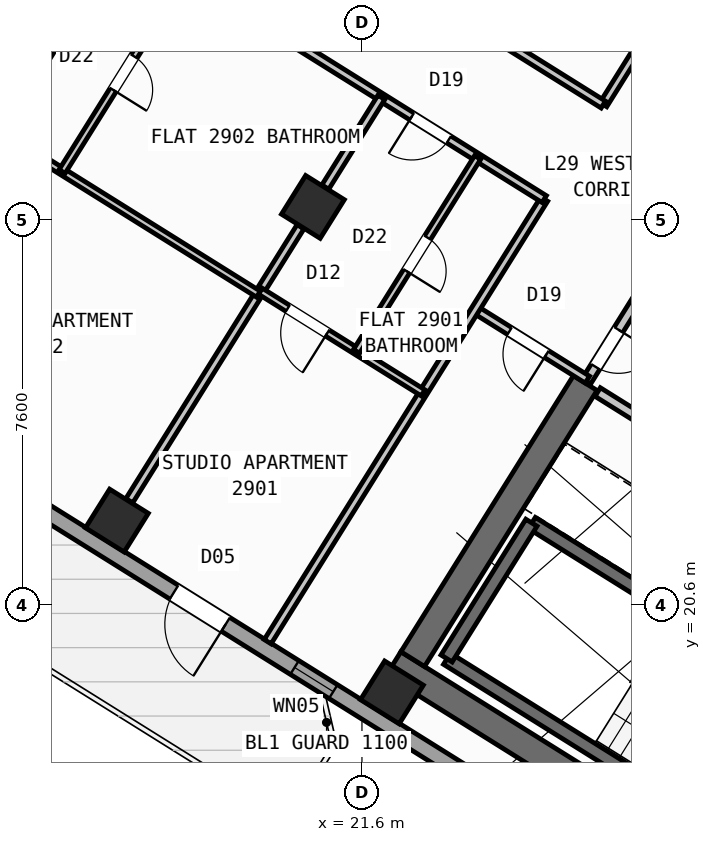
"""IFC4 building model, lengths in metres.
Left out: names, types, materials, properties, quantities, classifications, styles, units other than length and angle.
Written with IfcOpenShell. Run it as: python <this file> out.ifc"""

import sys

from ifc_helpers import new_model, si_unit, direction, frame, frame_2d, origin, origin_2d, place, context, subcontext, project, spatial, rectangle, hollow_rectangle, extrude, source, transform, mapped, element, fill, save


model = new_model("IFC4")
c1 = context("Model", 3, precision=1e-05, world=origin(), true_north=direction((0.0, 1.0)))
c2 = subcontext(c1, "Body", "Model", "MODEL_VIEW")
j1 = project(units=[si_unit("LENGTHUNIT", "METRE"), si_unit("PLANEANGLEUNIT", "RADIAN")], contexts=[c1])
p1 = place(None, origin())
s1 = spatial("IfcSite", under=j1, at=p1, CompositionType="ELEMENT")
p2 = place(p1, origin())
s2 = spatial("IfcBuilding", under=s1, at=p2, CompositionType="ELEMENT")
p3 = place(p2, frame((0.0, 0.0, 116.1)))
s3 = spatial("IfcBuildingStorey", under=s2, at=p3, CompositionType="ELEMENT", Elevation=116.1)
p4 = place(p3, frame((33.366, 12.477, 0.0), z_axis=(0.0, 0.0, 1.0), x_axis=(-0.848047359947, 0.529920442413, 0.0)))
e1 = element("IfcWall", 1, at=p4, inside=s3, PredefinedType="SHEAR", context=c2, shape_type="SweptSolid", body=[
    extrude(rectangle(XDim=13.14, YDim=0.55, at=frame_2d((6.57, 0.0))), origin(), (0.0, 0.0, 1.0), 3.35),
])
p5 = place(p3, frame((26.007, 24.976, 0.0), z_axis=(0.0, 0.0, 1.0), x_axis=(-0.529923795287, -0.848045264823, 0.0)))
e2 = element("IfcWall", 2, at=p5, inside=s3, PredefinedType="SHEAR", context=c2, shape_type="SweptSolid", body=[
    extrude(rectangle(XDim=6.425, YDim=0.55, at=frame_2d((3.212, 0.0))), origin(), (0.0, 0.0, 1.0), 3.35),
])
m1 = source(origin(), c2, "Body", "SweptSolid", [
    extrude(hollow_rectangle(XDim=0.9, YDim=0.9, WallThickness=0.036, at=origin_2d()), origin(), (0.0, 0.0, 1.0), 3.6),
])
for number, where, z_axis, x_axis in (
    (3, (22.191, 18.87, 0.0), (0.0, 0.0, 1.0), (-0.848, 0.53, 0.0)),
    (4, (20.632, 28.452, 0.0), (0.0, 0.0, 1.0), (-0.848, 0.53, 0.0)),
    (5, (16.764, 22.261, 0.0), (0.0, 0.0, 1.0), (-0.848, 0.53, 0.0)),
    (6, (15.205, 31.844, 0.0), (0.0, 0.0, 1.0), (-0.848, 0.53, 0.0)),
):
    element("IfcColumn", number, at=place(p3, frame(where, z_axis=z_axis, x_axis=x_axis)), inside=s3, PredefinedType="COLUMN", context=c2, shape_type="MappedRepresentation", body=[
        mapped(m1, transform((0.0, 0.0, 0.0), scale=1.0)),
    ])
p6 = place(p3, frame((31.76, 12.183, 0.0), z_axis=(0.0, 0.0, 1.0), x_axis=(-0.848047074256, 0.529920899612, 0.0)))
e7 = element("IfcWall", 7, at=p6, inside=s3, PredefinedType="STANDARD", context=c2, shape_type="SweptSolid", body=[
    extrude(rectangle(XDim=30.652, YDim=0.32, at=frame_2d((15.326, 0.0))), origin(), (0.0, 0.0, 1.0), 3.35),
])
p7 = place(p6, frame((15.153, 0.0, 0.0)))
e8 = element("IfcOpeningElement", 8, at=p7, cuts=e7, PredefinedType="OPENING", context=c2, shape_type="SweptSolid", body=[
    extrude(rectangle(XDim=1.2, YDim=2.15, at=frame_2d((0.6, 1.075))), frame((0.0, 0.17, 0.0), z_axis=(0.0, -1.0, 0.0), x_axis=(1.0, 0.0, 0.0)), (0.0, 0.0, 1.0), 0.34),
])
p8 = place(p6, frame((2.002, 0.0, 0.8)))
e9 = element("IfcOpeningElement", 9, at=p8, cuts=e7, PredefinedType="OPENING", context=c2, shape_type="SweptSolid", body=[
    extrude(rectangle(XDim=2.1, YDim=1.55, at=frame_2d((1.05, 0.775))), frame((0.0, 0.17, 0.0), z_axis=(0.0, -1.0, 0.0), x_axis=(1.0, 0.0, 0.0)), (0.0, 0.0, 1.0), 0.34),
])
p9 = place(p6, frame((7.206, 0.0, 0.8)))
e10 = element("IfcOpeningElement", 10, at=p9, cuts=e7, PredefinedType="OPENING", context=c2, shape_type="SweptSolid", body=[
    extrude(rectangle(XDim=2.1, YDim=1.55, at=frame_2d((1.05, 0.775))), frame((0.0, 0.17, 0.0), z_axis=(0.0, -1.0, 0.0), x_axis=(1.0, 0.0, 0.0)), (0.0, 0.0, 1.0), 0.34),
])
p10 = place(p6, frame((12.648, 0.0, 1.0)))
e11 = element("IfcOpeningElement", 11, at=p10, cuts=e7, PredefinedType="OPENING", context=c2, shape_type="SweptSolid", body=[
    extrude(rectangle(XDim=0.9, YDim=1.25, at=frame_2d((0.45, 0.625))), frame((0.0, 0.17, 0.0), z_axis=(0.0, -1.0, 0.0), x_axis=(1.0, 0.0, 0.0)), (0.0, 0.0, 1.0), 0.34),
])
p11 = place(p6, frame((19.458, 0.0, 0.95)))
e12 = element("IfcOpeningElement", 12, at=p11, cuts=e7, PredefinedType="OPENING", context=c2, shape_type="SweptSolid", body=[
    extrude(rectangle(XDim=1.2, YDim=1.4, at=frame_2d((0.6, 0.7))), frame((0.0, 0.17, 0.0), z_axis=(0.0, -1.0, 0.0), x_axis=(1.0, 0.0, 0.0)), (0.0, 0.0, 1.0), 0.34),
])
p12 = place(p6, frame((21.858, 0.0, 0.95)))
e13 = element("IfcOpeningElement", 13, at=p12, cuts=e7, PredefinedType="OPENING", context=c2, shape_type="SweptSolid", body=[
    extrude(rectangle(XDim=1.2, YDim=1.4, at=frame_2d((0.6, 0.7))), frame((0.0, 0.17, 0.0), z_axis=(0.0, -1.0, 0.0), x_axis=(1.0, 0.0, 0.0)), (0.0, 0.0, 1.0), 0.34),
])
p13 = place(p6, frame((27.266, 0.0, 0.8)))
e14 = element("IfcOpeningElement", 14, at=p13, cuts=e7, PredefinedType="OPENING", context=c2, shape_type="SweptSolid", body=[
    extrude(rectangle(XDim=2.1, YDim=1.55, at=frame_2d((1.05, 0.775))), frame((0.0, 0.17, 0.0), z_axis=(0.0, -1.0, 0.0), x_axis=(1.0, 0.0, 0.0)), (0.0, 0.0, 1.0), 0.34),
])
p14 = place(p3, frame((5.7, 28.71, 0.0), z_axis=(0.0, 0.0, 1.0), x_axis=(0.529923711467, 0.8480453172, 0.0)))
e15 = element("IfcWall", 15, at=p14, inside=s3, PredefinedType="STANDARD", context=c2, shape_type="SweptSolid", body=[
    extrude(rectangle(XDim=21.587, YDim=0.32, at=frame_2d((10.794, 0.0))), origin(), (0.0, 0.0, 1.0), 2.775),
])
p15 = place(p14, frame((2.119, 0.0, 0.8)))
e16 = element("IfcOpeningElement", 16, at=p15, cuts=e15, PredefinedType="OPENING", context=c2, shape_type="SweptSolid", body=[
    extrude(rectangle(XDim=2.1, YDim=1.55, at=frame_2d((1.05, 0.775))), frame((0.0, 0.17, 0.0), z_axis=(0.0, -1.0, 0.0), x_axis=(1.0, 0.0, 0.0)), (0.0, 0.0, 1.0), 0.34),
])
p16 = place(p14, frame((17.256, 0.0, 0.85)))
e17 = element("IfcOpeningElement", 17, at=p16, cuts=e15, PredefinedType="OPENING", context=c2, shape_type="SweptSolid", body=[
    extrude(rectangle(XDim=1.8, YDim=1.5, at=frame_2d((0.9, 0.75))), frame((0.0, 0.17, 0.0), z_axis=(0.0, -1.0, 0.0), x_axis=(1.0, 0.0, 0.0)), (0.0, 0.0, 1.0), 0.34),
])
p17 = place(p3, frame((17.424, 47.083, 0.0), z_axis=(0.0, 0.0, 1.0), x_axis=(0.848049927979, -0.529916332693, 0.0)))
e18 = element("IfcWall", 18, at=p17, inside=s3, PredefinedType="STANDARD", context=c2, shape_type="SweptSolid", body=[
    extrude(rectangle(XDim=29.223, YDim=0.32, at=frame_2d((14.612, 0.0))), origin(), (0.0, 0.0, 1.0), 3.35),
])
p18 = place(p17, frame((8.839, 0.0, 0.0)))
e19 = element("IfcOpeningElement", 19, at=p18, cuts=e18, PredefinedType="OPENING", context=c2, shape_type="SweptSolid", body=[
    extrude(rectangle(XDim=1.05, YDim=2.15, at=frame_2d((0.525, 1.075))), frame((0.0, 0.17, 0.0), z_axis=(0.0, -1.0, 0.0), x_axis=(1.0, 0.0, 0.0)), (0.0, 0.0, 1.0), 0.34),
])
p19 = place(p17, frame((0.719, 0.0, 0.85)))
e20 = element("IfcOpeningElement", 20, at=p19, cuts=e18, PredefinedType="OPENING", context=c2, shape_type="SweptSolid", body=[
    extrude(rectangle(XDim=1.8, YDim=1.5, at=frame_2d((0.9, 0.75))), frame((0.0, 0.17, 0.0), z_axis=(0.0, -1.0, 0.0), x_axis=(1.0, 0.0, 0.0)), (0.0, 0.0, 1.0), 0.34),
])
p20 = place(p17, frame((3.981, 0.0, 0.85)))
e21 = element("IfcOpeningElement", 21, at=p20, cuts=e18, PredefinedType="OPENING", context=c2, shape_type="SweptSolid", body=[
    extrude(rectangle(XDim=1.5, YDim=1.5, at=frame_2d((0.75, 0.75))), frame((0.0, 0.17, 0.0), z_axis=(0.0, -1.0, 0.0), x_axis=(1.0, 0.0, 0.0)), (0.0, 0.0, 1.0), 0.34),
])
p21 = place(p17, frame((7.021, 0.0, 0.95)))
e22 = element("IfcOpeningElement", 22, at=p21, cuts=e18, PredefinedType="OPENING", context=c2, shape_type="SweptSolid", body=[
    extrude(rectangle(XDim=1.2, YDim=1.4, at=frame_2d((0.6, 0.7))), frame((0.0, 0.17, 0.0), z_axis=(0.0, -1.0, 0.0), x_axis=(1.0, 0.0, 0.0)), (0.0, 0.0, 1.0), 0.34),
])
p22 = place(p17, frame((14.471, 0.0, 0.95)))
e23 = element("IfcOpeningElement", 23, at=p22, cuts=e18, PredefinedType="OPENING", context=c2, shape_type="SweptSolid", body=[
    extrude(rectangle(XDim=1.2, YDim=1.4, at=frame_2d((0.6, 0.7))), frame((0.0, 0.17, 0.0), z_axis=(0.0, -1.0, 0.0), x_axis=(1.0, 0.0, 0.0)), (0.0, 0.0, 1.0), 0.34),
])
p23 = place(p17, frame((17.254, 0.0, 1.0)))
e24 = element("IfcOpeningElement", 24, at=p23, cuts=e18, PredefinedType="OPENING", context=c2, shape_type="SweptSolid", body=[
    extrude(rectangle(XDim=0.9, YDim=1.25, at=frame_2d((0.45, 0.625))), frame((0.0, 0.17, 0.0), z_axis=(0.0, -1.0, 0.0), x_axis=(1.0, 0.0, 0.0)), (0.0, 0.0, 1.0), 0.34),
])
p24 = place(p17, frame((20.764, 0.0, 0.8)))
e25 = element("IfcOpeningElement", 25, at=p24, cuts=e18, PredefinedType="OPENING", context=c2, shape_type="SweptSolid", body=[
    extrude(rectangle(XDim=2.1, YDim=1.55, at=frame_2d((1.05, 0.775))), frame((0.0, 0.17, 0.0), z_axis=(0.0, -1.0, 0.0), x_axis=(1.0, 0.0, 0.0)), (0.0, 0.0, 1.0), 0.34),
])
p25 = place(p17, frame((25.403, 0.0, 0.8)))
e26 = element("IfcOpeningElement", 26, at=p25, cuts=e18, PredefinedType="OPENING", context=c2, shape_type="SweptSolid", body=[
    extrude(rectangle(XDim=2.1, YDim=1.55, at=frame_2d((1.05, 0.775))), frame((0.0, 0.17, 0.0), z_axis=(0.0, -1.0, 0.0), x_axis=(1.0, 0.0, 0.0)), (0.0, 0.0, 1.0), 0.34),
])
p26 = place(p3, frame((29.605, 15.581, 0.0), z_axis=(0.0, 0.0, 1.0), x_axis=(-0.848036911448, 0.529937163087, 0.0)))
e27 = element("IfcWall", 27, at=p26, inside=s3, PredefinedType="SHEAR", context=c2, shape_type="SweptSolid", body=[
    extrude(rectangle(XDim=7.46, YDim=0.26, at=frame_2d((3.73, 0.0))), origin(), (0.0, 0.0, 1.0), 3.35),
])
p27 = place(p3, frame((31.28, 18.261, 0.0), z_axis=(0.0, 0.0, 1.0), x_axis=(-0.848051618787, 0.529913626805, 0.0)))
e28 = element("IfcWall", 28, at=p27, inside=s3, PredefinedType="SHEAR", context=c2, shape_type="SweptSolid", body=[
    extrude(rectangle(XDim=7.46, YDim=0.26, at=frame_2d((3.73, 0.0))), origin(), (0.0, 0.0, 1.0), 3.35),
])
p28 = place(p27, frame((0.36, 0.0, 0.0)))
e29 = element("IfcOpeningElement", 29, at=p28, cuts=e28, PredefinedType="OPENING", context=c2, shape_type="SweptSolid", body=[
    extrude(rectangle(XDim=0.86, YDim=2.05, at=frame_2d((0.43, 1.025))), frame((0.0, 0.14, 0.0), z_axis=(0.0, -1.0, 0.0), x_axis=(1.0, 0.0, 0.0)), (0.0, 0.0, 1.0), 0.28),
])
p29 = place(p3, frame((24.945, 22.22, 0.0), z_axis=(0.0, 0.0, 1.0), x_axis=(-0.529908658664, -0.84805472316, 0.0)))
e30 = element("IfcWall", 30, at=p29, inside=s3, PredefinedType="SHEAR", context=c2, shape_type="SweptSolid", body=[
    extrude(rectangle(XDim=3.16, YDim=0.26, at=frame_2d((1.58, 0.0))), origin(), (0.0, 0.0, 1.0), 3.35),
])
p30 = place(p3, frame((31.525, 21.504, 0.0), z_axis=(0.0, 0.0, 1.0), x_axis=(-0.848040211232, 0.529931882541, 0.0)))
e31 = element("IfcWall", 31, at=p30, inside=s3, PredefinedType="STANDARD", context=c2, shape_type="SweptSolid", body=[
    extrude(rectangle(XDim=6.218, YDim=0.2, at=frame_2d((3.109, 0.0))), origin(), (0.0, 0.0, 1.0), 3.34),
])
p31 = place(p30, frame((4.4, 0.0, 0.0)))
e32 = element("IfcOpeningElement", 32, at=p31, cuts=e31, PredefinedType="OPENING", context=c2, shape_type="SweptSolid", body=[
    extrude(rectangle(XDim=0.86, YDim=2.05, at=frame_2d((0.43, 1.025))), frame((0.0, 0.11, 0.0), z_axis=(0.0, -1.0, 0.0), x_axis=(1.0, 0.0, 0.0)), (0.0, 0.0, 1.0), 0.22),
])
p32 = place(p30, frame((1.45, 0.0, 0.0)))
e33 = element("IfcOpeningElement", 33, at=p32, cuts=e31, PredefinedType="OPENING", context=c2, shape_type="SweptSolid", body=[
    extrude(rectangle(XDim=0.86, YDim=2.05, at=frame_2d((0.43, 1.025))), frame((0.0, 0.11, 0.0), z_axis=(0.0, -1.0, 0.0), x_axis=(1.0, 0.0, 0.0)), (0.0, 0.0, 1.0), 0.22),
])
p33 = place(p3, frame((27.596, 27.52, 0.0), z_axis=(0.0, 0.0, 1.0), x_axis=(-0.529865479138, -0.848081702443, 0.0)))
e34 = element("IfcWall", 34, at=p33, inside=s3, PredefinedType="STANDARD", context=c2, shape_type="SweptSolid", body=[
    extrude(rectangle(XDim=2.96, YDim=0.2, at=frame_2d((1.48, 0.0))), origin(), (0.0, 0.0, 1.0), 3.34),
])
p34 = place(p33, frame((1.76, 0.0, 0.0)))
e35 = element("IfcOpeningElement", 35, at=p34, cuts=e34, PredefinedType="OPENING", context=c2, shape_type="SweptSolid", body=[
    extrude(rectangle(XDim=0.86, YDim=2.05, at=frame_2d((0.43, 1.025))), frame((0.0, 0.11, 0.0), z_axis=(0.0, -1.0, 0.0), x_axis=(1.0, 0.0, 0.0)), (0.0, 0.0, 1.0), 0.22),
])
p35 = place(p3, frame((26.049, 25.044, 0.0), z_axis=(0.0, 0.0, 1.0), x_axis=(-0.848050851465, 0.529914854792, 0.0)))
e36 = element("IfcWall", 36, at=p35, inside=s3, PredefinedType="PARTITIONING", context=c2, shape_type="SweptSolid", body=[
    extrude(rectangle(XDim=2.61, YDim=0.16, at=frame_2d((1.305, 0.0))), origin(), (0.0, 0.0, 1.0), 2.775),
])
p36 = place(p35, frame((0.95, 0.0, 0.0)))
e37 = element("IfcOpeningElement", 37, at=p36, cuts=e36, PredefinedType="OPENING", context=c2, shape_type="SweptSolid", body=[
    extrude(rectangle(XDim=0.86, YDim=2.05, at=frame_2d((0.43, 1.025))), frame((0.0, 0.09, 0.0), z_axis=(0.0, -1.0, 0.0), x_axis=(1.0, 0.0, 0.0)), (0.0, 0.0, 1.0), 0.18),
])
p37 = place(p3, frame((31.239, 38.274, 0.0), z_axis=(0.0, 0.0, 1.0), x_axis=(-0.529920220799, -0.848047498427, 0.0)))
e38 = element("IfcWall", 38, at=p37, inside=s3, PredefinedType="PARTITIONING", context=c2, shape_type="SweptSolid", body=[
    extrude(rectangle(XDim=9.2, YDim=0.16, at=frame_2d((4.6, 0.0))), origin(), (0.0, 0.0, 1.0), 3.34),
])
p38 = place(p3, frame((25.198, 28.606, 0.0), z_axis=(0.0, 0.0, 1.0), x_axis=(-0.529926497642, -0.848043576178, 0.0)))
e39 = element("IfcWall", 39, at=p38, inside=s3, PredefinedType="PARTITIONING", context=c2, shape_type="SweptSolid", body=[
    extrude(rectangle(XDim=10.3, YDim=0.16, at=frame_2d((5.15, 0.0))), origin(), (0.0, 0.0, 1.0), 3.34),
])
p39 = place(p3, frame((26.363, 30.472, 0.0), z_axis=(0.0, 0.0, 1.0), x_axis=(-0.848052408131, 0.529912363569, 0.0)))
e40 = element("IfcWall", 40, at=p39, inside=s3, PredefinedType="PARTITIONING", context=c2, shape_type="SweptSolid", body=[
    extrude(rectangle(XDim=16.73, YDim=0.16, at=frame_2d((8.365, 0.0))), origin(), (0.0, 0.0, 1.0), 3.34),
])
p40 = place(p39, frame((7.55, 0.0, 0.0)))
e41 = element("IfcOpeningElement", 41, at=p40, cuts=e40, PredefinedType="OPENING", context=c2, shape_type="SweptSolid", body=[
    extrude(rectangle(XDim=1.0, YDim=2.1, at=frame_2d((0.5, 1.05))), frame((0.0, 0.09, 0.0), z_axis=(0.0, -1.0, 0.0), x_axis=(1.0, 0.0, 0.0)), (0.0, 0.0, 1.0), 0.18),
])
p41 = place(p39, frame((11.14, 0.0, 0.0)))
e42 = element("IfcOpeningElement", 42, at=p41, cuts=e40, PredefinedType="OPENING", context=c2, shape_type="SweptSolid", body=[
    extrude(rectangle(XDim=1.0, YDim=2.1, at=frame_2d((0.5, 1.05))), frame((0.0, 0.09, 0.0), z_axis=(0.0, -1.0, 0.0), x_axis=(1.0, 0.0, 0.0)), (0.0, 0.0, 1.0), 0.18),
])
p42 = place(p3, frame((25.198, 28.606, 0.0), z_axis=(0.0, 0.0, 1.0), x_axis=(-0.848052408131, 0.529912363569, 0.0)))
e43 = element("IfcWall", 43, at=p42, inside=s3, PredefinedType="PARTITIONING", context=c2, shape_type="SweptSolid", body=[
    extrude(rectangle(XDim=16.73, YDim=0.16, at=frame_2d((8.365, 0.0))), origin(), (0.0, 0.0, 1.0), 3.34),
])
p43 = place(p42, frame((2.22, 0.0, 0.0)))
e44 = element("IfcOpeningElement", 44, at=p43, cuts=e43, PredefinedType="OPENING", context=c2, shape_type="SweptSolid", body=[
    extrude(rectangle(XDim=0.86, YDim=2.05, at=frame_2d((0.43, 1.025))), frame((0.0, 0.09, 0.0), z_axis=(0.0, -1.0, 0.0), x_axis=(1.0, 0.0, 0.0)), (0.0, 0.0, 1.0), 0.18),
])
p44 = place(p42, frame((12.084, 0.0, 0.0)))
e45 = element("IfcOpeningElement", 45, at=p44, cuts=e43, PredefinedType="OPENING", context=c2, shape_type="SweptSolid", body=[
    extrude(rectangle(XDim=1.0, YDim=2.1, at=frame_2d((0.5, 1.05))), frame((0.0, 0.09, 0.0), z_axis=(0.0, -1.0, 0.0), x_axis=(1.0, 0.0, 0.0)), (0.0, 0.0, 1.0), 0.18),
])
p45 = place(p3, frame((21.983, 30.615, 0.0), z_axis=(0.0, 0.0, 1.0), x_axis=(-0.529956894714, -0.848024580862, 0.0)))
e46 = element("IfcWall", 46, at=p45, inside=s3, PredefinedType="PARTITIONING", context=c2, shape_type="SweptSolid", body=[
    extrude(rectangle(XDim=2.088, YDim=0.16, at=frame_2d((1.044, 0.0))), origin(), (0.0, 0.0, 1.0), 2.775),
])
p46 = place(p3, frame((20.387, 28.06, 0.0), z_axis=(0.0, 0.0, 1.0), x_axis=(-0.529902564924, -0.848058530814, 0.0)))
e47 = element("IfcWall", 47, at=p46, inside=s3, PredefinedType="PARTITIONING", context=c2, shape_type="SweptSolid", body=[
    extrude(rectangle(XDim=6.376, YDim=0.16, at=frame_2d((3.188, 0.0))), origin(), (0.0, 0.0, 1.0), 2.775),
])
p47 = place(p3, frame((22.807, 24.781, 0.0), z_axis=(0.0, 0.0, 1.0), x_axis=(-0.84803087207, 0.529946827537, 0.0)))
e48 = element("IfcWall", 48, at=p47, inside=s3, PredefinedType="PLUMBINGWALL", context=c2, shape_type="SweptSolid", body=[
    extrude(rectangle(XDim=3.79, YDim=0.14, at=frame_2d((1.895, 0.0))), origin(), (0.0, 0.0, 1.0), 3.34),
])
p48 = place(p47, frame((2.23, 0.0, 0.0)))
e49 = element("IfcOpeningElement", 49, at=p48, cuts=e48, PredefinedType="OPENING", context=c2, shape_type="SweptSolid", body=[
    extrude(rectangle(XDim=0.92, YDim=2.08, at=frame_2d((0.46, 1.04))), frame((0.0, 0.08, 0.0), z_axis=(0.0, -1.0, 0.0), x_axis=(1.0, 0.0, 0.0)), (0.0, 0.0, 1.0), 0.16),
])
p49 = place(p3, frame((23.883, 29.427, 0.0), z_axis=(0.0, 0.0, 1.0), x_axis=(-0.529950281337, -0.84802871373, 0.0)))
e50 = element("IfcWall", 50, at=p49, inside=s3, PredefinedType="PLUMBINGWALL", context=c2, shape_type="SweptSolid", body=[
    extrude(rectangle(XDim=4.51, YDim=0.14, at=frame_2d((2.255, 0.0))), origin(), (0.0, 0.0, 1.0), 2.995),
])
p50 = place(p49, frame((1.865, 0.0, 0.0)))
e51 = element("IfcOpeningElement", 51, at=p50, cuts=e50, PredefinedType="OPENING", context=c2, shape_type="SweptSolid", body=[
    extrude(rectangle(XDim=0.78, YDim=2.05, at=frame_2d((0.39, 1.025))), frame((0.0, 0.08, 0.0), z_axis=(0.0, -1.0, 0.0), x_axis=(1.0, 0.0, 0.0)), (0.0, 0.0, 1.0), 0.16),
])
p51 = place(p3, frame((19.556, 26.73, 0.0), z_axis=(0.0, 0.0, 1.0), x_axis=(-0.848043949058, 0.52992590092, 0.0)))
e52 = element("IfcWall", 52, at=p51, inside=s3, PredefinedType="PLUMBINGWALL", context=c2, shape_type="SweptSolid", body=[
    extrude(rectangle(XDim=12.92, YDim=0.14, at=frame_2d((6.46, 0.0))), origin(), (0.0, 0.0, 1.0), 3.34),
])
p52 = place(p51, frame((5.849, 0.0, 0.0)))
e53 = element("IfcOpeningElement", 53, at=p52, cuts=e52, PredefinedType="OPENING", context=c2, shape_type="SweptSolid", body=[
    extrude(rectangle(XDim=0.92, YDim=2.08, at=frame_2d((0.46, 1.04))), frame((0.0, 0.08, 0.0), z_axis=(0.0, -1.0, 0.0), x_axis=(1.0, 0.0, 0.0)), (0.0, 0.0, 1.0), 0.16),
])
p53 = place(p3, frame((18.109, 33.035, 0.0), z_axis=(0.0, 0.0, 1.0), x_axis=(-0.529893526057, -0.848064178611, 0.0)))
e54 = element("IfcWall", 54, at=p53, inside=s3, PredefinedType="PLUMBINGWALL", context=c2, shape_type="SweptSolid", body=[
    extrude(rectangle(XDim=4.58, YDim=0.14, at=frame_2d((2.29, 0.0))), origin(), (0.0, 0.0, 1.0), 3.34),
])
p54 = place(p53, frame((1.9, 0.0, 0.0)))
e55 = element("IfcOpeningElement", 55, at=p54, cuts=e54, PredefinedType="OPENING", context=c2, shape_type="SweptSolid", body=[
    extrude(rectangle(XDim=0.78, YDim=2.05, at=frame_2d((0.39, 1.025))), frame((0.0, 0.08, 0.0), z_axis=(0.0, -1.0, 0.0), x_axis=(1.0, 0.0, 0.0)), (0.0, 0.0, 1.0), 0.16),
])
m2 = source(origin(), c2, "Body", "SweptSolid", [
    extrude(rectangle(XDim=1.2, YDim=2.15, at=frame_2d((0.6, 1.075))), frame((0.0, 0.025, 0.0), z_axis=(0.0, -1.0, 0.0), x_axis=(1.0, 0.0, 0.0)), (0.0, 0.0, 1.0), 0.05),
])
p55 = place(p7, origin())
e56 = element("IfcDoor", 56, at=p55, inside=s3, OperationType="SINGLE_SWING_LEFT", PredefinedType="DOOR", context=c2, shape_type="MappedRepresentation", body=[
    mapped(m2, transform((0.0, 0.0, 0.0), scale=1.0)),
])
fill(e8, e56)
m3 = source(origin(), c2, "Body", "SweptSolid", [
    extrude(rectangle(XDim=0.9, YDim=1.25, at=frame_2d((0.45, 0.625))), frame((0.0, 0.03, 0.0), z_axis=(0.0, -1.0, 0.0), x_axis=(1.0, 0.0, 0.0)), (0.0, 0.0, 1.0), 0.06),
])
p56 = place(p10, origin())
e57 = element("IfcWindow", 57, at=p56, inside=s3, PartitioningType="SINGLE_PANEL", PredefinedType="WINDOW", context=c2, shape_type="MappedRepresentation", body=[
    mapped(m3, transform((0.0, 0.0, 0.0), scale=1.0)),
])
fill(e11, e57)
m4 = source(origin(), c2, "Body", "SweptSolid", [
    extrude(rectangle(XDim=0.86, YDim=2.05, at=frame_2d((0.43, 1.025))), frame((0.0, 0.025, 0.0), z_axis=(0.0, -1.0, 0.0), x_axis=(1.0, 0.0, 0.0)), (0.0, 0.0, 1.0), 0.05),
])
p57 = place(p36, origin())
e58 = element("IfcDoor", 58, at=p57, inside=s3, OperationType="SINGLE_SWING_LEFT", PredefinedType="DOOR", context=c2, shape_type="MappedRepresentation", body=[
    mapped(m4, transform((0.0, 0.0, 0.0), scale=1.0)),
])
fill(e37, e58)
p58 = place(p34, origin())
e59 = element("IfcDoor", 59, at=p58, inside=s3, OperationType="SINGLE_SWING_LEFT", PredefinedType="DOOR", context=c2, shape_type="MappedRepresentation", body=[
    mapped(m4, transform((0.0, 0.0, 0.0), scale=1.0)),
])
fill(e35, e59)
p59 = place(p43, origin())
e60 = element("IfcDoor", 60, at=p59, inside=s3, OperationType="SINGLE_SWING_RIGHT", PredefinedType="DOOR", context=c2, shape_type="MappedRepresentation", body=[
    mapped(m4, transform((0.0, 0.0, 0.0), scale=1.0)),
])
fill(e44, e60)
m5 = source(origin(), c2, "Body", "SweptSolid", [
    extrude(rectangle(XDim=0.92, YDim=2.08, at=frame_2d((0.46, 1.04))), frame((0.0, 0.025, 0.0), z_axis=(0.0, -1.0, 0.0), x_axis=(1.0, 0.0, 0.0)), (0.0, 0.0, 1.0), 0.05),
])
p60 = place(p48, origin())
e61 = element("IfcDoor", 61, at=p60, inside=s3, OperationType="SINGLE_SWING_LEFT", PredefinedType="DOOR", context=c2, shape_type="MappedRepresentation", body=[
    mapped(m5, transform((0.0, 0.0, 0.0), scale=1.0)),
])
fill(e49, e61)
m6 = source(origin(), c2, "Body", "SweptSolid", [
    extrude(rectangle(XDim=0.78, YDim=2.05, at=frame_2d((0.39, 1.025))), frame((0.0, 0.025, 0.0), z_axis=(0.0, -1.0, 0.0), x_axis=(1.0, 0.0, 0.0)), (0.0, 0.0, 1.0), 0.05),
])
p61 = place(p50, origin())
e62 = element("IfcDoor", 62, at=p61, inside=s3, OperationType="SINGLE_SWING_RIGHT", PredefinedType="DOOR", context=c2, shape_type="MappedRepresentation", body=[
    mapped(m6, transform((0.0, 0.0, 0.0), scale=1.0)),
])
fill(e51, e62)
p62 = place(p54, origin())
e63 = element("IfcDoor", 63, at=p62, inside=s3, OperationType="SINGLE_SWING_RIGHT", PredefinedType="DOOR", context=c2, shape_type="MappedRepresentation", body=[
    mapped(m6, transform((0.0, 0.0, 0.0), scale=1.0)),
])
fill(e55, e63)
save(model, sys.argv[1])
